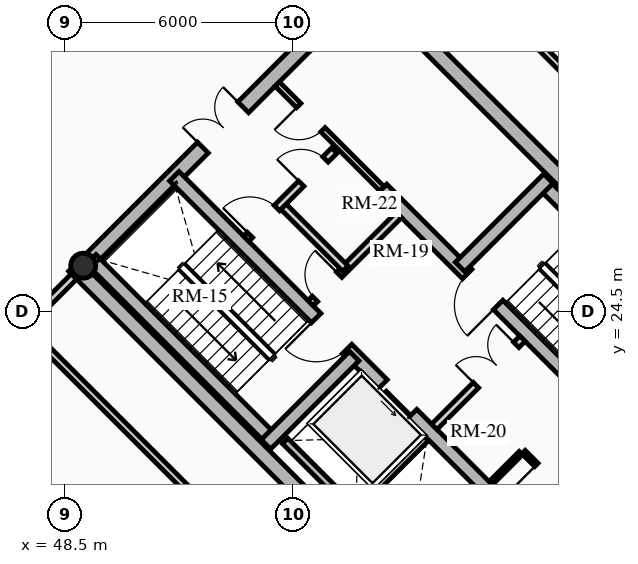
"""IFC4 building model, lengths in metres.
Left out: names, types, materials, properties, quantities, classifications, styles, units other than length and angle.
Written with IfcOpenShell. Run it as: python <this file> out.ifc"""

import sys

from ifc_helpers import new_model, si_unit, direction, frame, frame_2d, origin, origin_2d, place, context, subcontext, project, spatial, rectangle, hollow_circle, extrude, source, transform, mapped, element, fill, save


model = new_model("IFC4")
c1 = context("Model", 3, precision=1e-05, world=origin(), true_north=direction((0.0, 1.0)))
c2 = subcontext(c1, "Body", "Model", "MODEL_VIEW")
j1 = project(units=[si_unit("LENGTHUNIT", "METRE"), si_unit("PLANEANGLEUNIT", "RADIAN")], contexts=[c1])
p1 = place(None, origin())
s1 = spatial("IfcSite", under=j1, at=p1, CompositionType="ELEMENT")
p2 = place(p1, origin())
s2 = spatial("IfcBuilding", under=s1, at=p2, CompositionType="ELEMENT")
p3 = place(p2, frame((0.0, 0.0, 235.65)))
s3 = spatial("IfcBuildingStorey", under=s2, at=p3, CompositionType="ELEMENT", Elevation=235.65)
for number, where, z_axis, x_axis in (
    (1, (58.702, 15.732, 0.0), (0.0, 0.0, 1.0), (-0.707, 0.707, 0.0)),
    (2, (66.268, 23.298, 0.0), (0.0, 0.0, 1.0), (-0.707, 0.707, 0.0)),
):
    element("IfcWall", number, at=place(p3, frame(where, z_axis=z_axis, x_axis=x_axis)), inside=s3, PredefinedType="SHEAR", context=c2, shape_type="SweptSolid", body=[
        extrude(rectangle(XDim=14.1, YDim=0.4, at=frame_2d((7.05, 0.0))), origin(), (0.0, 0.0, 1.0), 4.68),
    ])
p4 = place(p3, frame((58.561, 15.873, 0.0), z_axis=(0.0, 0.0, 1.0), x_axis=(0.707106781187, 0.707106781187, 0.0)))
e3 = element("IfcWall", 3, at=p4, inside=s3, PredefinedType="SHEAR", context=c2, shape_type="SweptSolid", body=[
    extrude(rectangle(XDim=10.7, YDim=0.4, at=frame_2d((5.35, 0.0))), origin(), (0.0, 0.0, 1.0), 4.68),
])
m1 = source(origin(), c2, "Body", "SweptSolid", [
    extrude(rectangle(XDim=1.5, YDim=2.02, at=frame_2d((0.75, 1.01))), frame((0.0, 0.21, 0.0), z_axis=(0.0, -1.0, 0.0), x_axis=(1.0, 0.0, 0.0)), (0.0, 0.0, 1.0), 0.42),
])
p5 = place(p4, frame((5.45, 0.0, 0.0)))
e4 = element("IfcOpeningElement", 4, at=p5, cuts=e3, PredefinedType="OPENING", context=c2, shape_type="MappedRepresentation", body=[
    mapped(m1, transform((0.0, 0.0, 0.0), x_axis=(1.0, 0.0, 0.0), y_axis=(0.0, 1.0, 0.0), z_axis=(0.0, 0.0, 1.0), scale=1.0)),
])
p6 = place(p3, frame((48.873, 25.561, 0.0), z_axis=(0.0, 0.0, 1.0), x_axis=(0.707106781187, 0.707106781187, 0.0)))
e5 = element("IfcWall", 5, at=p6, inside=s3, PredefinedType="SHEAR", context=c2, shape_type="SweptSolid", body=[
    extrude(rectangle(XDim=10.7, YDim=0.4, at=frame_2d((5.35, 0.0))), origin(), (0.0, 0.0, 1.0), 4.68),
])
p7 = place(p6, frame((4.6, 0.0, 0.0)))
e6 = element("IfcOpeningElement", 6, at=p7, cuts=e5, PredefinedType="OPENING", context=c2, shape_type="MappedRepresentation", body=[
    mapped(m1, transform((0.0, 0.0, 0.0), x_axis=(1.0, 0.0, 0.0), y_axis=(0.0, 1.0, 0.0), z_axis=(0.0, 0.0, 1.0), scale=1.0)),
])
p8 = place(p3, frame((61.06, 18.373, 0.0), z_axis=(0.0, 0.0, 1.0), x_axis=(-0.707106781187, 0.707106781187, 0.0)))
e7 = element("IfcWall", 7, at=p8, inside=s3, PredefinedType="SHEAR", context=c2, shape_type="SweptSolid", body=[
    extrude(rectangle(XDim=13.7, YDim=0.35, at=frame_2d((6.85, 0.0))), origin(), (0.0, 0.0, 1.0), 4.68),
])
m2 = source(origin(), c2, "Body", "SweptSolid", [
    extrude(rectangle(XDim=1.1, YDim=2.015, at=frame_2d((0.55, 1.007))), frame((0.0, 0.185, 0.0), z_axis=(0.0, -1.0, 0.0), x_axis=(1.0, 0.0, 0.0)), (0.0, 0.0, 1.0), 0.37),
])
p9 = place(p8, frame((4.85, 0.0, 0.0)))
e8 = element("IfcOpeningElement", 8, at=p9, cuts=e7, PredefinedType="OPENING", context=c2, shape_type="MappedRepresentation", body=[
    mapped(m2, transform((0.0, 0.0, 0.0), x_axis=(1.0, 0.0, 0.0), y_axis=(0.0, 1.0, 0.0), z_axis=(0.0, 0.0, 1.0), scale=1.0)),
])
m3 = source(origin(), c2, "Body", "SweptSolid", [
    extrude(rectangle(XDim=1.15, YDim=2.02, at=frame_2d((0.575, 1.01))), frame((0.0, 0.185, 0.0), z_axis=(0.0, -1.0, 0.0), x_axis=(1.0, 0.0, 0.0)), (0.0, 0.0, 1.0), 0.37),
])
p10 = place(p8, frame((7.27, 0.0, 0.0)))
e9 = element("IfcOpeningElement", 9, at=p10, cuts=e7, PredefinedType="OPENING", context=c2, shape_type="MappedRepresentation", body=[
    mapped(m3, transform((0.0, 0.0, 0.0), x_axis=(1.0, 0.0, 0.0), y_axis=(0.0, 1.0, 0.0), z_axis=(0.0, 0.0, 1.0), scale=1.0)),
])
p11 = place(p3, frame((63.627, 20.94, 0.0), z_axis=(0.0, 0.0, 1.0), x_axis=(-0.707119496762, 0.707094065383, 0.0)))
e10 = element("IfcWall", 10, at=p11, inside=s3, PredefinedType="SHEAR", context=c2, shape_type="SweptSolid", body=[
    extrude(rectangle(XDim=9.6, YDim=0.35, at=frame_2d((4.8, 0.0))), origin(), (0.0, 0.0, 1.0), 4.68),
])
p12 = place(p11, frame((5.28, 0.0, 0.0)))
e11 = element("IfcOpeningElement", 11, at=p12, cuts=e10, PredefinedType="OPENING", context=c2, shape_type="MappedRepresentation", body=[
    mapped(m3, transform((0.0, 0.0, 0.0), x_axis=(1.0, 0.0, 0.0), y_axis=(0.0, 1.0, 0.0), z_axis=(0.0, 0.0, 1.0), scale=1.0)),
])
p13 = place(p3, frame((53.922, 21.141, 0.0), z_axis=(0.0, 0.0, 1.0), x_axis=(-0.707106781187, 0.707106781187, 0.0)))
e12 = element("IfcWall", 12, at=p13, inside=s3, PredefinedType="SHEAR", context=c2, shape_type="SweptSolid", body=[
    extrude(rectangle(XDim=6.695, YDim=0.35, at=frame_2d((3.348, 0.0))), origin(), (0.0, 0.0, 1.0), 4.68),
])
p14 = place(p3, frame((53.784, 21.003, 0.0), z_axis=(0.0, 0.0, 1.0), x_axis=(0.707106781187, 0.707106781187, 0.0)))
e13 = element("IfcWall", 13, at=p14, inside=s3, PredefinedType="SHEAR", context=c2, shape_type="SweptSolid", body=[
    extrude(rectangle(XDim=3.285, YDim=0.35, at=frame_2d((1.643, 0.0))), origin(), (0.0, 0.0, 1.0), 4.68),
])
p15 = place(p3, frame((65.812, 23.125, 0.0), z_axis=(0.0, 0.0, 1.0), x_axis=(-0.707106781187, 0.707106781187, 0.0)))
e14 = element("IfcWall", 14, at=p15, inside=s3, PredefinedType="SHEAR", context=c2, shape_type="SweptSolid", body=[
    extrude(rectangle(XDim=6.695, YDim=0.35, at=frame_2d((3.348, 0.0))), origin(), (0.0, 0.0, 1.0), 4.68),
])
p16 = place(p3, frame((58.893, 25.674, 0.0), z_axis=(0.0, 0.0, 1.0), x_axis=(0.707106781187, 0.707106781187, 0.0)))
e15 = element("IfcWall", 15, at=p16, inside=s3, PredefinedType="SHEAR", context=c2, shape_type="SweptSolid", body=[
    extrude(rectangle(XDim=3.285, YDim=0.35, at=frame_2d((1.643, 0.0))), origin(), (0.0, 0.0, 1.0), 4.68),
])
p17 = place(p3, frame((48.976, 25.706, 0.0), z_axis=(0.0, 0.0, 1.0), x_axis=(0.707106781187, 0.707106781187, 0.0)))
e16 = element("IfcColumn", 16, at=p17, inside=s3, PredefinedType="COLUMN", context=c2, shape_type="SweptSolid", body=[
    extrude(hollow_circle(Radius=0.33, WallThickness=0.025, at=origin_2d()), origin(), (0.0, 0.0, 1.0), 4.68),
])
p18 = place(p3, frame((55.888, 19.069, 0.0), z_axis=(0.0, 0.0, 1.0), x_axis=(0.707106781187, 0.707106781187, 0.0)))
e17 = element("IfcWall", 17, at=p18, inside=s3, PredefinedType="SHEAR", context=c2, shape_type="SweptSolid", body=[
    extrude(rectangle(XDim=2.97, YDim=0.2, at=frame_2d((1.485, 0.0))), origin(), (0.0, 0.0, 1.0), 4.68),
])
p19 = place(p3, frame((56.015, 19.366, 0.0), z_axis=(0.0, 0.0, 1.0), x_axis=(-0.707106781187, 0.707106781187, 0.0)))
e18 = element("IfcWall", 18, at=p19, inside=s3, PredefinedType="SHEAR", context=c2, shape_type="SweptSolid", body=[
    extrude(rectangle(XDim=2.44, YDim=0.2, at=frame_2d((1.22, 0.0))), origin(), (0.0, 0.0, 1.0), 4.68),
])
p20 = place(p3, frame((58.214, 21.467, 0.0), z_axis=(0.0, 0.0, 1.0), x_axis=(0.707106781187, 0.707106781187, 0.0)))
e19 = element("IfcWall", 19, at=p20, inside=s3, PredefinedType="PARTITIONING", context=c2, shape_type="SweptSolid", body=[
    extrude(rectangle(XDim=3.28, YDim=0.2, at=frame_2d((1.64, 0.0))), origin(), (0.0, 0.0, 1.0), 4.325),
])
m4 = source(origin(), c2, "Body", "SweptSolid", [
    extrude(rectangle(XDim=1.5, YDim=2.02, at=frame_2d((0.75, 1.01))), frame((0.0, 0.11, 0.0), z_axis=(0.0, -1.0, 0.0), x_axis=(1.0, 0.0, 0.0)), (0.0, 0.0, 1.0), 0.22),
])
p21 = place(p20, frame((1.55, 0.0, 0.0)))
e20 = element("IfcOpeningElement", 20, at=p21, cuts=e19, PredefinedType="OPENING", context=c2, shape_type="MappedRepresentation", body=[
    mapped(m4, transform((0.0, 0.0, 0.0), x_axis=(1.0, 0.0, 0.0), y_axis=(0.0, 1.0, 0.0), z_axis=(0.0, 0.0, 1.0), scale=1.0)),
])
p22 = place(p3, frame((54.961, 24.719, 0.0), z_axis=(0.0, 0.0, 1.0), x_axis=(0.707106781187, 0.707106781187, 0.0)))
e21 = element("IfcWall", 21, at=p22, inside=s3, PredefinedType="PARTITIONING", context=c2, shape_type="SweptSolid", body=[
    extrude(rectangle(XDim=3.28, YDim=0.2, at=frame_2d((1.64, 0.0))), origin(), (0.0, 0.0, 1.0), 4.325),
])
m5 = source(origin(), c2, "Body", "SweptSolid", [
    extrude(rectangle(XDim=0.9, YDim=2.005, at=frame_2d((0.45, 1.002))), frame((0.0, 0.11, 0.0), z_axis=(0.0, -1.0, 0.0), x_axis=(1.0, 0.0, 0.0)), (0.0, 0.0, 1.0), 0.22),
])
p23 = place(p22, frame((0.16, 0.0, 0.0)))
e22 = element("IfcOpeningElement", 22, at=p23, cuts=e21, PredefinedType="OPENING", context=c2, shape_type="MappedRepresentation", body=[
    mapped(m5, transform((0.0, 0.0, 0.0), x_axis=(1.0, 0.0, 0.0), y_axis=(0.0, 1.0, 0.0), z_axis=(0.0, 0.0, 1.0), scale=1.0)),
])
p24 = place(p3, frame((55.874, 25.631, 0.0), z_axis=(0.0, 0.0, 1.0), x_axis=(-0.707157639372, 0.707055919343, 0.0)))
e23 = element("IfcWall", 23, at=p24, inside=s3, PredefinedType="PARTITIONING", context=c2, shape_type="SweptSolid", body=[
    extrude(rectangle(XDim=2.4, YDim=0.2, at=frame_2d((1.2, 0.0))), origin(), (0.0, 0.0, 1.0), 4.325),
])
p25 = place(p3, frame((53.264, 26.416, 0.0), z_axis=(0.0, 0.0, 1.0), x_axis=(0.707106781187, 0.707106781187, 0.0)))
e24 = element("IfcWall", 24, at=p25, inside=s3, PredefinedType="PARTITIONING", context=c2, shape_type="SweptSolid", body=[
    extrude(rectangle(XDim=3.28, YDim=0.2, at=frame_2d((1.64, 0.0))), origin(), (0.0, 0.0, 1.0), 4.325),
])
m6 = source(origin(), c2, "Body", "SweptSolid", [
    extrude(rectangle(XDim=1.0, YDim=2.015, at=frame_2d((0.5, 1.007))), frame((0.0, 0.11, 0.0), z_axis=(0.0, -1.0, 0.0), x_axis=(1.0, 0.0, 0.0)), (0.0, 0.0, 1.0), 0.22),
])
p26 = place(p25, frame((0.14, 0.0, 0.0)))
e25 = element("IfcOpeningElement", 25, at=p26, cuts=e24, PredefinedType="OPENING", context=c2, shape_type="MappedRepresentation", body=[
    mapped(m6, transform((0.0, 0.0, 0.0), x_axis=(1.0, 0.0, 0.0), y_axis=(0.0, 1.0, 0.0), z_axis=(0.0, 0.0, 1.0), scale=1.0)),
])
p27 = place(p25, frame((2.05, 0.0, 0.0)))
e26 = element("IfcOpeningElement", 26, at=p27, cuts=e24, PredefinedType="OPENING", context=c2, shape_type="MappedRepresentation", body=[
    mapped(m5, transform((0.0, 0.0, 0.0), x_axis=(1.0, 0.0, 0.0), y_axis=(0.0, 1.0, 0.0), z_axis=(0.0, 0.0, 1.0), scale=1.0)),
])
p28 = place(p3, frame((61.835, 19.529, 0.0), z_axis=(0.0, 0.0, 1.0), x_axis=(-0.707174592913, 0.707038962956, 0.0)))
e27 = element("IfcWall", 27, at=p28, inside=s3, PredefinedType="PARTITIONING", context=c2, shape_type="SweptSolid", body=[
    extrude(rectangle(XDim=1.8, YDim=0.125, at=frame_2d((0.9, 0.0))), origin(), (0.0, 0.0, 1.0), 4.325),
])
m7 = source(origin(), c2, "Body", "SweptSolid", [
    extrude(rectangle(XDim=0.9, YDim=2.005, at=frame_2d((0.45, 1.002))), frame((0.0, 0.073, 0.0), z_axis=(0.0, -1.0, 0.0), x_axis=(1.0, 0.0, 0.0)), (0.0, 0.0, 1.0), 0.145),
])
p29 = place(p28, frame((0.42, 0.0, 0.0)))
e28 = element("IfcOpeningElement", 28, at=p29, cuts=e27, PredefinedType="OPENING", context=c2, shape_type="MappedRepresentation", body=[
    mapped(m7, transform((0.0, 0.0, 0.0), x_axis=(1.0, 0.0, 0.0), y_axis=(0.0, 1.0, 0.0), z_axis=(0.0, 0.0, 1.0), scale=1.0)),
])
p30 = place(p3, frame((59.713, 19.996, 0.0), z_axis=(0.0, 0.0, 1.0), x_axis=(0.707217726, 0.706995818963, 0.0)))
e29 = element("IfcWall", 29, at=p30, inside=s3, PredefinedType="PARTITIONING", context=c2, shape_type="SweptSolid", body=[
    extrude(rectangle(XDim=1.1, YDim=0.125, at=frame_2d((0.55, 0.0))), origin(), (0.0, 0.0, 1.0), 4.325),
])
p31 = place(p3, frame((56.839, 27.728, 0.0), z_axis=(0.0, 0.0, 1.0), x_axis=(-0.707106781187, 0.707106781187, 0.0)))
e30 = element("IfcWall", 30, at=p31, inside=s3, PredefinedType="PARTITIONING", context=c2, shape_type="SweptSolid", body=[
    extrude(rectangle(XDim=3.9, YDim=0.16, at=frame_2d((1.95, 0.0))), origin(), (0.0, 0.0, 1.0), 4.325),
])
m8 = source(origin(), c2, "Body", "SweptSolid", [
    extrude(rectangle(XDim=0.9, YDim=2.005, at=frame_2d((0.45, 1.002))), frame((0.0, 0.09, 0.0), z_axis=(0.0, -1.0, 0.0), x_axis=(1.0, 0.0, 0.0)), (0.0, 0.0, 1.0), 0.18),
])
p32 = place(p31, frame((2.2, 0.0, 0.0)))
e31 = element("IfcOpeningElement", 31, at=p32, cuts=e30, PredefinedType="OPENING", context=c2, shape_type="MappedRepresentation", body=[
    mapped(m8, transform((0.0, 0.0, 0.0), x_axis=(1.0, 0.0, 0.0), y_axis=(0.0, 1.0, 0.0), z_axis=(0.0, 0.0, 1.0), scale=1.0)),
])
p33 = place(p3, frame((58.419, 13.115, 0.0), z_axis=(0.0, 0.0, 1.0), x_axis=(0.707106781187, 0.707106781187, 0.0)))
e32 = element("IfcWall", 32, at=p33, inside=s3, PredefinedType="PARTITIONING", context=c2, shape_type="SweptSolid", body=[
    extrude(rectangle(XDim=14.8, YDim=0.18, at=frame_2d((7.4, 0.0))), origin(), (0.0, 0.0, 1.0), 3.616),
])
m9 = source(origin(), c2, "Body", "SweptSolid", [
    extrude(rectangle(XDim=1.4, YDim=2.02, at=frame_2d((0.7, 1.01))), frame((0.0, 0.1, 0.0), z_axis=(0.0, -1.0, 0.0), x_axis=(1.0, 0.0, 0.0)), (0.0, 0.0, 1.0), 0.2),
])
p34 = place(p33, frame((6.7, 0.0, 0.0)))
e33 = element("IfcOpeningElement", 33, at=p34, cuts=e32, PredefinedType="OPENING", context=c2, shape_type="MappedRepresentation", body=[
    mapped(m9, transform((0.0, 0.0, 0.0), x_axis=(1.0, 0.0, 0.0), y_axis=(0.0, 1.0, 0.0), z_axis=(0.0, 0.0, 1.0), scale=1.0)),
])
p35 = place(p3, frame((58.419, 13.115, 0.0), z_axis=(0.0, 0.0, 1.0), x_axis=(-0.707106781187, 0.707106781187, 0.0)))
e34 = element("IfcWall", 34, at=p35, inside=s3, PredefinedType="PARTITIONING", context=c2, shape_type="SweptSolid", body=[
    extrude(rectangle(XDim=15.55, YDim=0.18, at=frame_2d((7.775, 0.0))), origin(), (0.0, 0.0, 1.0), 3.616),
])
p36 = place(p35, frame((7.075, 0.0, 0.0)))
e35 = element("IfcOpeningElement", 35, at=p36, cuts=e34, PredefinedType="OPENING", context=c2, shape_type="MappedRepresentation", body=[
    mapped(m9, transform((0.0, 0.0, 0.0), x_axis=(1.0, 0.0, 0.0), y_axis=(0.0, 1.0, 0.0), z_axis=(0.0, 0.0, 1.0), scale=1.0)),
])
p37 = place(p3, frame((68.885, 23.581, 0.0), z_axis=(0.0, 0.0, 1.0), x_axis=(-0.707106781187, 0.707106781187, 0.0)))
e36 = element("IfcWall", 36, at=p37, inside=s3, PredefinedType="PARTITIONING", context=c2, shape_type="SweptSolid", body=[
    extrude(rectangle(XDim=15.55, YDim=0.18, at=frame_2d((7.775, 0.0))), origin(), (0.0, 0.0, 1.0), 2.892),
])
p38 = place(p37, frame((7.075, 0.0, 0.0)))
e37 = element("IfcOpeningElement", 37, at=p38, cuts=e36, PredefinedType="OPENING", context=c2, shape_type="MappedRepresentation", body=[
    mapped(m9, transform((0.0, 0.0, 0.0), x_axis=(1.0, 0.0, 0.0), y_axis=(0.0, 1.0, 0.0), z_axis=(0.0, 0.0, 1.0), scale=1.0)),
])
p39 = place(p3, frame((47.424, 24.111, 0.0), z_axis=(0.0, 0.0, 1.0), x_axis=(0.707172758026, 0.707040798191, 0.0)))
e38 = element("IfcWall", 38, at=p39, inside=s3, PredefinedType="PARTITIONING", context=c2, shape_type="SweptSolid", body=[
    extrude(rectangle(XDim=1.85, YDim=0.2, at=frame_2d((0.925, 0.0))), origin(), (0.0, 0.0, 1.0), 3.616),
])
m10 = source(origin(), c2, "Body", "SweptSolid", [
    extrude(rectangle(XDim=1.1, YDim=2.015, at=frame_2d((0.55, 1.007))), frame((0.0, 0.025, 0.0), z_axis=(0.0, -1.0, 0.0), x_axis=(1.0, 0.0, 0.0)), (0.0, 0.0, 1.0), 0.05),
])
p40 = place(p9, origin())
e39 = element("IfcDoor", 39, at=p40, inside=s3, OperationType="SLIDING_TO_LEFT", PredefinedType="DOOR", context=c2, shape_type="MappedRepresentation", body=[
    mapped(m10, transform((0.0, 0.0, 0.0), x_axis=(1.0, 0.0, 0.0), y_axis=(0.0, 1.0, 0.0), z_axis=(0.0, 0.0, 1.0), scale=1.0)),
])
fill(e8, e39)
m11 = source(origin(), c2, "Body", "SweptSolid", [
    extrude(rectangle(XDim=1.15, YDim=2.02, at=frame_2d((0.575, 1.01))), frame((0.0, 0.025, 0.0), z_axis=(0.0, -1.0, 0.0), x_axis=(1.0, 0.0, 0.0)), (0.0, 0.0, 1.0), 0.05),
])
p41 = place(p10, origin())
e40 = element("IfcDoor", 40, at=p41, inside=s3, OperationType="SINGLE_SWING_RIGHT", PredefinedType="DOOR", context=c2, shape_type="MappedRepresentation", body=[
    mapped(m11, transform((0.0, 0.0, 0.0), x_axis=(1.0, 0.0, 0.0), y_axis=(0.0, 1.0, 0.0), z_axis=(0.0, 0.0, 1.0), scale=1.0)),
])
fill(e9, e40)
p42 = place(p12, origin())
e41 = element("IfcDoor", 41, at=p42, inside=s3, OperationType="SINGLE_SWING_LEFT", PredefinedType="DOOR", context=c2, shape_type="MappedRepresentation", body=[
    mapped(m11, transform((0.0, 0.0, 0.0), x_axis=(1.0, 0.0, 0.0), y_axis=(0.0, 1.0, 0.0), z_axis=(0.0, 0.0, 1.0), scale=1.0)),
])
fill(e11, e41)
m12 = source(origin(), c2, "Body", "SweptSolid", [
    extrude(rectangle(XDim=1.5, YDim=2.02, at=frame_2d((0.75, 1.01))), frame((0.0, 0.025, 0.0), z_axis=(0.0, -1.0, 0.0), x_axis=(1.0, 0.0, 0.0)), (0.0, 0.0, 1.0), 0.05),
])
p43 = place(p7, origin())
e42 = element("IfcDoor", 42, at=p43, inside=s3, OperationType="DOUBLE_DOOR_SINGLE_SWING", PredefinedType="DOOR", context=c2, shape_type="MappedRepresentation", body=[
    mapped(m12, transform((0.0, 0.0, 0.0), x_axis=(1.0, 0.0, 0.0), y_axis=(0.0, 1.0, 0.0), z_axis=(0.0, 0.0, 1.0), scale=1.0)),
])
fill(e6, e42)
p44 = place(p21, origin())
e43 = element("IfcDoor", 43, at=p44, inside=s3, OperationType="DOUBLE_DOOR_SINGLE_SWING", PredefinedType="DOOR", context=c2, shape_type="MappedRepresentation", body=[
    mapped(m12, transform((0.0, 0.0, 0.0), x_axis=(1.0, 0.0, 0.0), y_axis=(0.0, 1.0, 0.0), z_axis=(0.0, 0.0, 1.0), scale=1.0)),
])
fill(e20, e43)
m13 = source(origin(), c2, "Body", "SweptSolid", [
    extrude(rectangle(XDim=0.9, YDim=2.005, at=frame_2d((0.45, 1.002))), frame((0.0, 0.025, 0.0), z_axis=(0.0, -1.0, 0.0), x_axis=(1.0, 0.0, 0.0)), (0.0, 0.0, 1.0), 0.05),
])
p45 = place(p23, origin())
e44 = element("IfcDoor", 44, at=p45, inside=s3, OperationType="SINGLE_SWING_RIGHT", PredefinedType="DOOR", context=c2, shape_type="MappedRepresentation", body=[
    mapped(m13, transform((0.0, 0.0, 0.0), x_axis=(1.0, 0.0, 0.0), y_axis=(0.0, 1.0, 0.0), z_axis=(0.0, 0.0, 1.0), scale=1.0)),
])
fill(e22, e44)
m14 = source(origin(), c2, "Body", "SweptSolid", [
    extrude(rectangle(XDim=1.0, YDim=2.015, at=frame_2d((0.5, 1.007))), frame((0.0, 0.025, 0.0), z_axis=(0.0, -1.0, 0.0), x_axis=(1.0, 0.0, 0.0)), (0.0, 0.0, 1.0), 0.05),
])
p46 = place(p26, origin())
e45 = element("IfcDoor", 45, at=p46, inside=s3, OperationType="SINGLE_SWING_LEFT", PredefinedType="DOOR", context=c2, shape_type="MappedRepresentation", body=[
    mapped(m14, transform((0.0, 0.0, 0.0), x_axis=(1.0, 0.0, 0.0), y_axis=(0.0, 1.0, 0.0), z_axis=(0.0, 0.0, 1.0), scale=1.0)),
])
fill(e25, e45)
p47 = place(p29, origin())
e46 = element("IfcDoor", 46, at=p47, inside=s3, OperationType="SINGLE_SWING_RIGHT", PredefinedType="DOOR", context=c2, shape_type="MappedRepresentation", body=[
    mapped(m13, transform((0.0, 0.0, 0.0), x_axis=(1.0, 0.0, 0.0), y_axis=(0.0, 1.0, 0.0), z_axis=(0.0, 0.0, 1.0), scale=1.0)),
])
fill(e28, e46)
p48 = place(p27, origin())
e47 = element("IfcDoor", 47, at=p48, inside=s3, OperationType="SINGLE_SWING_LEFT", PredefinedType="DOOR", context=c2, shape_type="MappedRepresentation", body=[
    mapped(m13, transform((0.0, 0.0, 0.0), x_axis=(1.0, 0.0, 0.0), y_axis=(0.0, 1.0, 0.0), z_axis=(0.0, 0.0, 1.0), scale=1.0)),
])
fill(e26, e47)
p49 = place(p32, origin())
e48 = element("IfcDoor", 48, at=p49, inside=s3, OperationType="SINGLE_SWING_RIGHT", PredefinedType="DOOR", context=c2, shape_type="MappedRepresentation", body=[
    mapped(m13, transform((0.0, 0.0, 0.0), x_axis=(1.0, 0.0, 0.0), y_axis=(0.0, 1.0, 0.0), z_axis=(0.0, 0.0, 1.0), scale=1.0)),
])
fill(e31, e48)
save(model, sys.argv[1])
